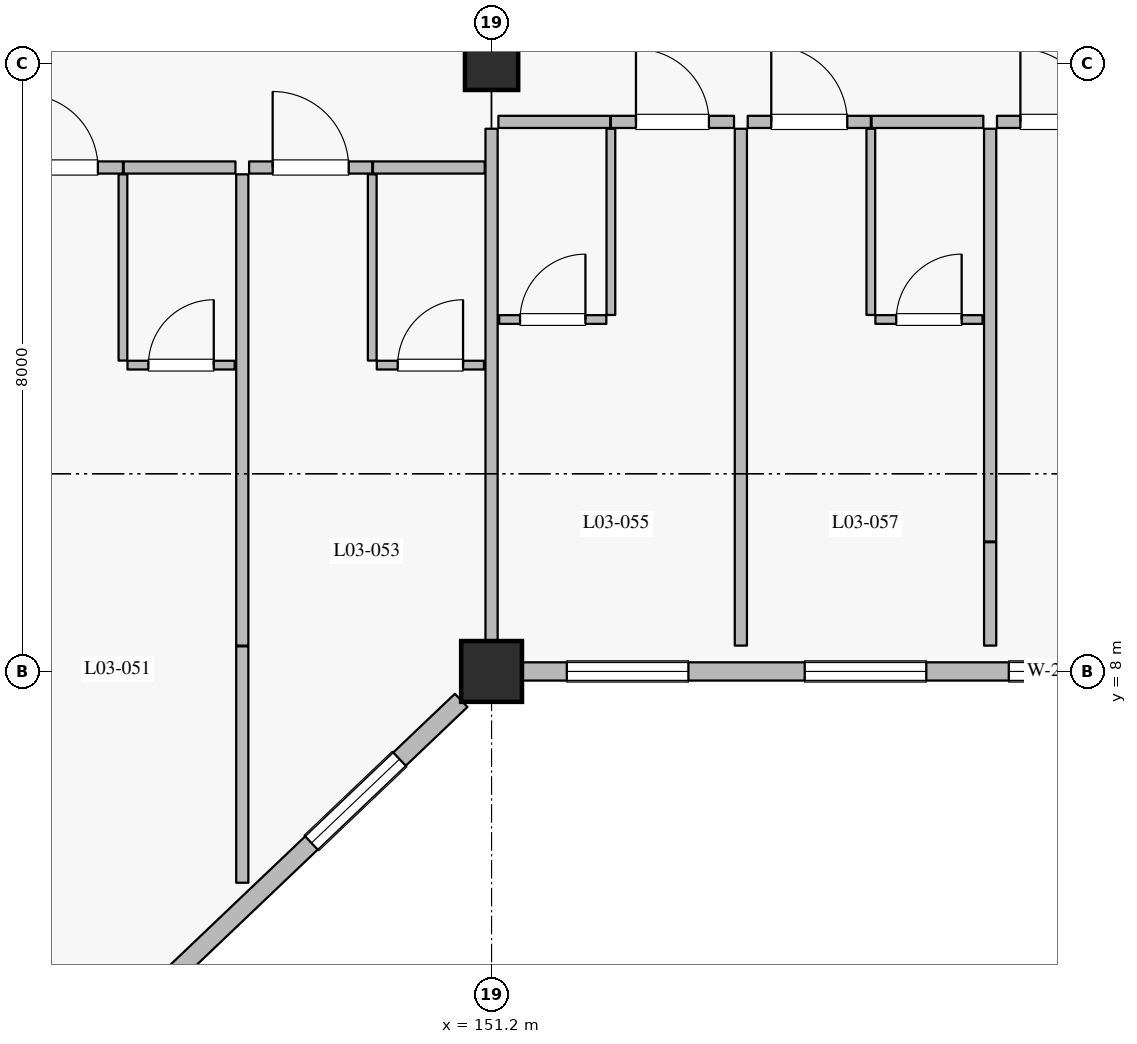
"""IFC4 building model, lengths in metres.
Left out: names, types, materials, properties, quantities, classifications, styles, units other than length and angle.
Written with IfcOpenShell. Run it as: python <this file> out.ifc"""

import sys

from ifc_helpers import new_model, si_unit, direction, frame, frame_2d, origin, origin_2d, place, context, subcontext, project, spatial, rectangle, extrude, element, fill, save


model = new_model("IFC4")
c1 = context("Model", 3, precision=1e-05, world=origin(), true_north=direction((0.0, 1.0)))
c2 = subcontext(c1, "Body", "Model", "MODEL_VIEW")
j1 = project(units=[si_unit("LENGTHUNIT", "METRE"), si_unit("PLANEANGLEUNIT", "RADIAN")], contexts=[c1])
p1 = place(None, origin())
s1 = spatial("IfcSite", under=j1, at=p1, CompositionType="ELEMENT")
p2 = place(p1, origin())
s2 = spatial("IfcBuilding", under=s1, at=p2, CompositionType="ELEMENT")
p3 = place(p2, frame((0.0, 0.0, 16.2)))
s3 = spatial("IfcBuildingStorey", under=s2, at=p3, CompositionType="ELEMENT", Elevation=16.2)
p4 = place(p3, frame((151.2, 8.0, 0.0), z_axis=(0.0, 0.0, 1.0), x_axis=(1.0, 0.0, 0.0)))
e1 = element("IfcColumn", 1, at=p4, inside=s3, PredefinedType="COLUMN", context=c2, shape_type="SweptSolid", body=[
    extrude(rectangle(XDim=0.8, YDim=0.8, at=origin_2d()), origin(), (0.0, 0.0, 1.0), 4.8),
])
p5 = place(p3, frame((151.2, 16.0, 0.0), z_axis=(0.0, 0.0, 1.0), x_axis=(1.0, 0.0, 0.0)))
e2 = element("IfcColumn", 2, at=p5, inside=s3, PredefinedType="COLUMN", context=c2, shape_type="SweptSolid", body=[
    extrude(rectangle(XDim=0.7, YDim=0.7, at=origin_2d()), origin(), (0.0, 0.0, 1.0), 4.8),
])
p6 = place(p3, frame((150.8, 7.619, 0.0), z_axis=(0.0, 0.0, 1.0), x_axis=(-0.724156739794, -0.689635422677, 0.0)))
e3 = element("IfcWall", 3, at=p6, inside=s3, PredefinedType="SOLIDWALL", context=c2, shape_type="SweptSolid", body=[
    extrude(rectangle(XDim=10.495, YDim=0.24, at=frame_2d((5.248, 0.0))), origin(), (0.0, 0.0, 1.0), 4.13),
])
p7 = place(p6, frame((1.12, 0.0, 0.8)))
e4 = element("IfcOpeningElement", 4, at=p7, cuts=e3, PredefinedType="OPENING", context=c2, shape_type="SweptSolid", body=[
    extrude(rectangle(XDim=1.6, YDim=1.6, at=frame_2d((0.8, 0.8))), frame((0.0, 0.13, 0.0), z_axis=(0.0, -1.0, 0.0), x_axis=(1.0, 0.0, 0.0)), (0.0, 0.0, 1.0), 0.26),
])
p8 = place(p6, frame((5.442, 0.0, 0.8)))
e5 = element("IfcOpeningElement", 5, at=p8, cuts=e3, PredefinedType="OPENING", context=c2, shape_type="SweptSolid", body=[
    extrude(rectangle(XDim=1.6, YDim=1.6, at=frame_2d((0.8, 0.8))), frame((0.0, 0.13, 0.0), z_axis=(0.0, -1.0, 0.0), x_axis=(1.0, 0.0, 0.0)), (0.0, 0.0, 1.0), 0.26),
])
p9 = place(p6, frame((8.77, 0.0, 0.8)))
e6 = element("IfcOpeningElement", 6, at=p9, cuts=e3, PredefinedType="OPENING", context=c2, shape_type="SweptSolid", body=[
    extrude(rectangle(XDim=1.6, YDim=1.6, at=frame_2d((0.8, 0.8))), frame((0.0, 0.13, 0.0), z_axis=(0.0, -1.0, 0.0), x_axis=(1.0, 0.0, 0.0)), (0.0, 0.0, 1.0), 0.26),
])
p10 = place(p3, frame((159.2, 8.0, 0.0), z_axis=(0.0, 0.0, 1.0), x_axis=(-1.0, 0.0, 0.0)))
e7 = element("IfcWall", 7, at=p10, inside=s3, PredefinedType="SOLIDWALL", context=c2, shape_type="SweptSolid", body=[
    extrude(rectangle(XDim=7.6, YDim=0.24, at=frame_2d((3.8, 0.0))), origin(), (0.0, 0.0, 1.0), 4.13),
])
p11 = place(p10, frame((0.145, 0.0, 0.8)))
e8 = element("IfcOpeningElement", 8, at=p11, cuts=e7, PredefinedType="OPENING", context=c2, shape_type="SweptSolid", body=[
    extrude(rectangle(XDim=1.05, YDim=1.65, at=frame_2d((0.525, 0.825))), frame((0.0, 0.13, 0.0), z_axis=(0.0, -1.0, 0.0), x_axis=(1.0, 0.0, 0.0)), (0.0, 0.0, 1.0), 0.26),
])
p12 = place(p10, frame((2.28, 0.0, 0.8)))
e9 = element("IfcOpeningElement", 9, at=p12, cuts=e7, PredefinedType="OPENING", context=c2, shape_type="SweptSolid", body=[
    extrude(rectangle(XDim=1.6, YDim=1.6, at=frame_2d((0.8, 0.8))), frame((0.0, 0.13, 0.0), z_axis=(0.0, -1.0, 0.0), x_axis=(1.0, 0.0, 0.0)), (0.0, 0.0, 1.0), 0.26),
])
p13 = place(p10, frame((5.41, 0.0, 0.8)))
e10 = element("IfcOpeningElement", 10, at=p13, cuts=e7, PredefinedType="OPENING", context=c2, shape_type="SweptSolid", body=[
    extrude(rectangle(XDim=1.6, YDim=1.6, at=frame_2d((0.8, 0.8))), frame((0.0, 0.13, 0.0), z_axis=(0.0, -1.0, 0.0), x_axis=(1.0, 0.0, 0.0)), (0.0, 0.0, 1.0), 0.26),
])
p14 = place(p3, frame((144.73, 14.63, 0.0), z_axis=(0.0, 0.0, 1.0), x_axis=(1.0, 0.0, 0.0)))
e11 = element("IfcWall", 11, at=p14, inside=s3, PredefinedType="PARTITIONING", context=c2, shape_type="SweptSolid", body=[
    extrude(rectangle(XDim=1.62, YDim=0.16, at=frame_2d((0.81, 0.0))), origin(), (0.0, 0.0, 1.0), 4.535),
])
p15 = place(p14, frame((0.33, 0.0, 0.0)))
e12 = element("IfcOpeningElement", 12, at=p15, cuts=e11, PredefinedType="OPENING", context=c2, shape_type="SweptSolid", body=[
    extrude(rectangle(XDim=0.96, YDim=2.2, at=frame_2d((0.48, 1.1))), frame((0.0, 0.09, 0.0), z_axis=(0.0, -1.0, 0.0), x_axis=(1.0, 0.0, 0.0)), (0.0, 0.0, 1.0), 0.18),
])
p16 = place(p3, frame((146.36, 14.63, 0.0), z_axis=(0.0, 0.0, 1.0), x_axis=(1.0, 0.0, 0.0)))
e13 = element("IfcWall", 13, at=p16, inside=s3, PredefinedType="PARTITIONING", context=c2, shape_type="SweptSolid", body=[
    extrude(rectangle(XDim=1.47, YDim=0.16, at=frame_2d((0.735, 0.0))), origin(), (0.0, 0.0, 1.0), 4.535),
])
p17 = place(p3, frame((146.35, 12.09, 0.0), z_axis=(0.0, 0.0, 1.0), x_axis=(0.0, 1.0, 0.0)))
e14 = element("IfcWall", 14, at=p17, inside=s3, PredefinedType="PARTITIONING", context=c2, shape_type="SweptSolid", body=[
    extrude(rectangle(XDim=2.45, YDim=0.115, at=frame_2d((1.225, 0.0))), origin(), (0.0, 0.0, 1.0), 4.535),
])
p18 = place(p3, frame((146.41, 12.03, 0.0), z_axis=(0.0, 0.0, 1.0), x_axis=(1.0, 0.0, 0.0)))
e15 = element("IfcWall", 15, at=p18, inside=s3, PredefinedType="PARTITIONING", context=c2, shape_type="SweptSolid", body=[
    extrude(rectangle(XDim=1.41, YDim=0.115, at=frame_2d((0.705, 0.0))), origin(), (0.0, 0.0, 1.0), 4.535),
])
p19 = place(p18, frame((0.275, 0.0, 0.0)))
e16 = element("IfcOpeningElement", 16, at=p19, cuts=e15, PredefinedType="OPENING", context=c2, shape_type="SweptSolid", body=[
    extrude(rectangle(XDim=0.86, YDim=2.12, at=frame_2d((0.43, 1.06))), frame((0.0, 0.067, 0.0), z_axis=(0.0, -1.0, 0.0), x_axis=(1.0, 0.0, 0.0)), (0.0, 0.0, 1.0), 0.135),
])
p20 = place(p3, frame((147.92, 5.22, 0.0), z_axis=(0.0, 0.0, 1.0), x_axis=(0.0, 1.0, 0.0)))
e17 = element("IfcWall", 17, at=p20, inside=s3, PredefinedType="PARTITIONING", context=c2, shape_type="SweptSolid", body=[
    extrude(rectangle(XDim=3.11, YDim=0.16, at=frame_2d((1.555, 0.0))), origin(), (0.0, 0.0, 1.0), 4.535),
])
p21 = place(p3, frame((148.01, 14.63, 0.0), z_axis=(0.0, 0.0, 1.0), x_axis=(1.0, 0.0, 0.0)))
e18 = element("IfcWall", 18, at=p21, inside=s3, PredefinedType="PARTITIONING", context=c2, shape_type="SweptSolid", body=[
    extrude(rectangle(XDim=1.62, YDim=0.16, at=frame_2d((0.81, 0.0))), origin(), (0.0, 0.0, 1.0), 4.535),
])
p22 = place(p21, frame((0.31, 0.0, 0.0)))
e19 = element("IfcOpeningElement", 19, at=p22, cuts=e18, PredefinedType="OPENING", context=c2, shape_type="SweptSolid", body=[
    extrude(rectangle(XDim=1.0, YDim=2.25, at=frame_2d((0.5, 1.125))), frame((0.0, 0.09, 0.0), z_axis=(0.0, -1.0, 0.0), x_axis=(1.0, 0.0, 0.0)), (0.0, 0.0, 1.0), 0.18),
])
p23 = place(p3, frame((149.64, 14.63, 0.0), z_axis=(0.0, 0.0, 1.0), x_axis=(1.0, 0.0, 0.0)))
e20 = element("IfcWall", 20, at=p23, inside=s3, PredefinedType="PARTITIONING", context=c2, shape_type="SweptSolid", body=[
    extrude(rectangle(XDim=1.47, YDim=0.16, at=frame_2d((0.735, 0.0))), origin(), (0.0, 0.0, 1.0), 4.535),
])
p24 = place(p3, frame((149.63, 12.09, 0.0), z_axis=(0.0, 0.0, 1.0), x_axis=(0.0, 1.0, 0.0)))
e21 = element("IfcWall", 21, at=p24, inside=s3, PredefinedType="PARTITIONING", context=c2, shape_type="SweptSolid", body=[
    extrude(rectangle(XDim=2.45, YDim=0.115, at=frame_2d((1.225, 0.0))), origin(), (0.0, 0.0, 1.0), 4.535),
])
p25 = place(p3, frame((149.69, 12.03, 0.0), z_axis=(0.0, 0.0, 1.0), x_axis=(1.0, 0.0, 0.0)))
e22 = element("IfcWall", 22, at=p25, inside=s3, PredefinedType="PARTITIONING", context=c2, shape_type="SweptSolid", body=[
    extrude(rectangle(XDim=1.41, YDim=0.115, at=frame_2d((0.705, 0.0))), origin(), (0.0, 0.0, 1.0), 4.535),
])
p26 = place(p25, frame((0.275, 0.0, 0.0)))
e23 = element("IfcOpeningElement", 23, at=p26, cuts=e22, PredefinedType="OPENING", context=c2, shape_type="SweptSolid", body=[
    extrude(rectangle(XDim=0.86, YDim=2.12, at=frame_2d((0.43, 1.06))), frame((0.0, 0.067, 0.0), z_axis=(0.0, -1.0, 0.0), x_axis=(1.0, 0.0, 0.0)), (0.0, 0.0, 1.0), 0.135),
])
p27 = place(p3, frame((147.92, 8.34, 0.0), z_axis=(0.0, 0.0, 1.0), x_axis=(0.0, 1.0, 0.0)))
e24 = element("IfcWall", 24, at=p27, inside=s3, PredefinedType="PARTITIONING", context=c2, shape_type="SweptSolid", body=[
    extrude(rectangle(XDim=6.2, YDim=0.16, at=frame_2d((3.1, 0.0))), origin(), (0.0, 0.0, 1.0), 4.535),
])
p28 = place(p3, frame((151.29, 15.23, 0.0), z_axis=(0.0, 0.0, 1.0), x_axis=(1.0, 0.0, 0.0)))
e25 = element("IfcWall", 25, at=p28, inside=s3, PredefinedType="PARTITIONING", context=c2, shape_type="SweptSolid", body=[
    extrude(rectangle(XDim=1.47, YDim=0.16, at=frame_2d((0.735, 0.0))), origin(), (0.0, 0.0, 1.0), 4.535),
])
p29 = place(p3, frame((152.77, 15.23, 0.0), z_axis=(0.0, 0.0, 1.0), x_axis=(1.0, 0.0, 0.0)))
e26 = element("IfcWall", 26, at=p29, inside=s3, PredefinedType="PARTITIONING", context=c2, shape_type="SweptSolid", body=[
    extrude(rectangle(XDim=1.62, YDim=0.16, at=frame_2d((0.81, 0.0))), origin(), (0.0, 0.0, 1.0), 4.535),
])
p30 = place(p29, frame((0.33, 0.0, 0.0)))
e27 = element("IfcOpeningElement", 27, at=p30, cuts=e26, PredefinedType="OPENING", context=c2, shape_type="SweptSolid", body=[
    extrude(rectangle(XDim=0.96, YDim=2.2, at=frame_2d((0.48, 1.1))), frame((0.0, 0.09, 0.0), z_axis=(0.0, -1.0, 0.0), x_axis=(1.0, 0.0, 0.0)), (0.0, 0.0, 1.0), 0.18),
])
p31 = place(p3, frame((152.77, 12.69, 0.0), z_axis=(0.0, 0.0, 1.0), x_axis=(0.0, 1.0, 0.0)))
e28 = element("IfcWall", 28, at=p31, inside=s3, PredefinedType="PARTITIONING", context=c2, shape_type="SweptSolid", body=[
    extrude(rectangle(XDim=2.45, YDim=0.115, at=frame_2d((1.225, 0.0))), origin(), (0.0, 0.0, 1.0), 4.535),
])
p32 = place(p3, frame((151.3, 12.63, 0.0), z_axis=(0.0, 0.0, 1.0), x_axis=(1.0, 0.0, 0.0)))
e29 = element("IfcWall", 29, at=p32, inside=s3, PredefinedType="PARTITIONING", context=c2, shape_type="SweptSolid", body=[
    extrude(rectangle(XDim=1.41, YDim=0.115, at=frame_2d((0.705, 0.0))), origin(), (0.0, 0.0, 1.0), 4.535),
])
p33 = place(p32, frame((0.275, 0.0, 0.0)))
e30 = element("IfcOpeningElement", 30, at=p33, cuts=e29, PredefinedType="OPENING", context=c2, shape_type="SweptSolid", body=[
    extrude(rectangle(XDim=0.86, YDim=2.12, at=frame_2d((0.43, 1.06))), frame((0.0, 0.067, 0.0), z_axis=(0.0, -1.0, 0.0), x_axis=(1.0, 0.0, 0.0)), (0.0, 0.0, 1.0), 0.135),
])
p34 = place(p3, frame((151.2, 8.34, 0.0), z_axis=(0.0, 0.0, 1.0), x_axis=(0.0, 1.0, 0.0)))
e31 = element("IfcWall", 31, at=p34, inside=s3, PredefinedType="PARTITIONING", context=c2, shape_type="SweptSolid", body=[
    extrude(rectangle(XDim=6.8, YDim=0.16, at=frame_2d((3.4, 0.0))), origin(), (0.0, 0.0, 1.0), 3.98),
])
p35 = place(p3, frame((154.57, 15.23, 0.0), z_axis=(0.0, 0.0, 1.0), x_axis=(1.0, 0.0, 0.0)))
e32 = element("IfcWall", 32, at=p35, inside=s3, PredefinedType="PARTITIONING", context=c2, shape_type="SweptSolid", body=[
    extrude(rectangle(XDim=1.62, YDim=0.16, at=frame_2d((0.81, 0.0))), origin(), (0.0, 0.0, 1.0), 4.535),
])
p36 = place(p35, frame((0.31, 0.0, 0.0)))
e33 = element("IfcOpeningElement", 33, at=p36, cuts=e32, PredefinedType="OPENING", context=c2, shape_type="SweptSolid", body=[
    extrude(rectangle(XDim=1.0, YDim=2.25, at=frame_2d((0.5, 1.125))), frame((0.0, 0.09, 0.0), z_axis=(0.0, -1.0, 0.0), x_axis=(1.0, 0.0, 0.0)), (0.0, 0.0, 1.0), 0.18),
])
p37 = place(p3, frame((156.2, 15.23, 0.0), z_axis=(0.0, 0.0, 1.0), x_axis=(1.0, 0.0, 0.0)))
e34 = element("IfcWall", 34, at=p37, inside=s3, PredefinedType="PARTITIONING", context=c2, shape_type="SweptSolid", body=[
    extrude(rectangle(XDim=1.47, YDim=0.16, at=frame_2d((0.735, 0.0))), origin(), (0.0, 0.0, 1.0), 4.535),
])
p38 = place(p3, frame((156.19, 12.69, 0.0), z_axis=(0.0, 0.0, 1.0), x_axis=(0.0, 1.0, 0.0)))
e35 = element("IfcWall", 35, at=p38, inside=s3, PredefinedType="PARTITIONING", context=c2, shape_type="SweptSolid", body=[
    extrude(rectangle(XDim=2.45, YDim=0.115, at=frame_2d((1.225, 0.0))), origin(), (0.0, 0.0, 1.0), 4.535),
])
p39 = place(p3, frame((156.25, 12.63, 0.0), z_axis=(0.0, 0.0, 1.0), x_axis=(1.0, 0.0, 0.0)))
e36 = element("IfcWall", 36, at=p39, inside=s3, PredefinedType="PARTITIONING", context=c2, shape_type="SweptSolid", body=[
    extrude(rectangle(XDim=1.41, YDim=0.115, at=frame_2d((0.705, 0.0))), origin(), (0.0, 0.0, 1.0), 4.535),
])
p40 = place(p39, frame((0.275, 0.0, 0.0)))
e37 = element("IfcOpeningElement", 37, at=p40, cuts=e36, PredefinedType="OPENING", context=c2, shape_type="SweptSolid", body=[
    extrude(rectangle(XDim=0.86, YDim=2.12, at=frame_2d((0.43, 1.06))), frame((0.0, 0.067, 0.0), z_axis=(0.0, -1.0, 0.0), x_axis=(1.0, 0.0, 0.0)), (0.0, 0.0, 1.0), 0.135),
])
p41 = place(p3, frame((154.48, 8.34, 0.0), z_axis=(0.0, 0.0, 1.0), x_axis=(0.0, 1.0, 0.0)))
e38 = element("IfcWall", 38, at=p41, inside=s3, PredefinedType="PARTITIONING", context=c2, shape_type="SweptSolid", body=[
    extrude(rectangle(XDim=6.8, YDim=0.16, at=frame_2d((3.4, 0.0))), origin(), (0.0, 0.0, 1.0), 4.535),
])
p42 = place(p3, frame((157.76, 8.34, 0.0), z_axis=(0.0, 0.0, 1.0), x_axis=(0.0, 1.0, 0.0)))
e39 = element("IfcWall", 39, at=p42, inside=s3, PredefinedType="PARTITIONING", context=c2, shape_type="SweptSolid", body=[
    extrude(rectangle(XDim=1.36, YDim=0.16, at=frame_2d((0.68, 0.0))), origin(), (0.0, 0.0, 1.0), 4.535),
])
p43 = place(p3, frame((157.85, 15.23, 0.0), z_axis=(0.0, 0.0, 1.0), x_axis=(1.0, 0.0, 0.0)))
e40 = element("IfcWall", 40, at=p43, inside=s3, PredefinedType="PARTITIONING", context=c2, shape_type="SweptSolid", body=[
    extrude(rectangle(XDim=1.62, YDim=0.16, at=frame_2d((0.81, 0.0))), origin(), (0.0, 0.0, 1.0), 4.535),
])
p44 = place(p43, frame((0.308, 0.0, 0.0)))
e41 = element("IfcOpeningElement", 41, at=p44, cuts=e40, PredefinedType="OPENING", context=c2, shape_type="SweptSolid", body=[
    extrude(rectangle(XDim=0.96, YDim=2.2, at=frame_2d((0.48, 1.1))), frame((0.0, 0.09, 0.0), z_axis=(0.0, -1.0, 0.0), x_axis=(1.0, 0.0, 0.0)), (0.0, 0.0, 1.0), 0.18),
])
p45 = place(p3, frame((157.76, 9.71, 0.0), z_axis=(0.0, 0.0, 1.0), x_axis=(0.0, 1.0, 0.0)))
e42 = element("IfcWall", 42, at=p45, inside=s3, PredefinedType="PARTITIONING", context=c2, shape_type="SweptSolid", body=[
    extrude(rectangle(XDim=5.43, YDim=0.16, at=frame_2d((2.715, 0.0))), origin(), (0.0, 0.0, 1.0), 4.535),
])
p46 = place(p7, origin())
e43 = element("IfcWindow", 43, at=p46, inside=s3, PartitioningType="SINGLE_PANEL", PredefinedType="WINDOW", context=c2, shape_type="SweptSolid", body=[
    extrude(rectangle(XDim=1.6, YDim=1.6, at=frame_2d((0.8, 0.8))), frame((0.0, 0.03, 0.0), z_axis=(0.0, -1.0, 0.0), x_axis=(1.0, 0.0, 0.0)), (0.0, 0.0, 1.0), 0.06),
])
fill(e4, e43)
p47 = place(p11, origin())
e44 = element("IfcWindow", 44, at=p47, inside=s3, PartitioningType="SINGLE_PANEL", PredefinedType="WINDOW", context=c2, shape_type="SweptSolid", body=[
    extrude(rectangle(XDim=1.05, YDim=1.65, at=frame_2d((0.525, 0.825))), frame((0.0, 0.03, 0.0), z_axis=(0.0, -1.0, 0.0), x_axis=(1.0, 0.0, 0.0)), (0.0, 0.0, 1.0), 0.06),
])
fill(e8, e44)
p48 = place(p12, origin())
e45 = element("IfcWindow", 45, at=p48, inside=s3, PartitioningType="SINGLE_PANEL", PredefinedType="WINDOW", context=c2, shape_type="SweptSolid", body=[
    extrude(rectangle(XDim=1.6, YDim=1.6, at=frame_2d((0.8, 0.8))), frame((0.0, 0.03, 0.0), z_axis=(0.0, -1.0, 0.0), x_axis=(1.0, 0.0, 0.0)), (0.0, 0.0, 1.0), 0.06),
])
fill(e9, e45)
p49 = place(p13, origin())
e46 = element("IfcWindow", 46, at=p49, inside=s3, PartitioningType="SINGLE_PANEL", PredefinedType="WINDOW", context=c2, shape_type="SweptSolid", body=[
    extrude(rectangle(XDim=1.6, YDim=1.6, at=frame_2d((0.8, 0.8))), frame((0.0, 0.03, 0.0), z_axis=(0.0, -1.0, 0.0), x_axis=(1.0, 0.0, 0.0)), (0.0, 0.0, 1.0), 0.06),
])
fill(e10, e46)
p50 = place(p15, origin())
e47 = element("IfcDoor", 47, at=p50, inside=s3, OperationType="SINGLE_SWING_LEFT", PredefinedType="DOOR", context=c2, shape_type="SweptSolid", body=[
    extrude(rectangle(XDim=0.96, YDim=2.2, at=frame_2d((0.48, 1.1))), frame((0.0, 0.025, 0.0), z_axis=(0.0, -1.0, 0.0), x_axis=(1.0, 0.0, 0.0)), (0.0, 0.0, 1.0), 0.05),
])
fill(e12, e47)
p51 = place(p19, origin())
e48 = element("IfcDoor", 48, at=p51, inside=s3, OperationType="SINGLE_SWING_RIGHT", PredefinedType="DOOR", context=c2, shape_type="SweptSolid", body=[
    extrude(rectangle(XDim=0.86, YDim=2.12, at=frame_2d((0.43, 1.06))), frame((0.0, 0.025, 0.0), z_axis=(0.0, -1.0, 0.0), x_axis=(1.0, 0.0, 0.0)), (0.0, 0.0, 1.0), 0.05),
])
fill(e16, e48)
p52 = place(p22, origin())
e49 = element("IfcDoor", 49, at=p52, inside=s3, OperationType="SINGLE_SWING_LEFT", PredefinedType="DOOR", context=c2, shape_type="SweptSolid", body=[
    extrude(rectangle(XDim=1.0, YDim=2.25, at=frame_2d((0.5, 1.125))), frame((0.0, 0.025, 0.0), z_axis=(0.0, -1.0, 0.0), x_axis=(1.0, 0.0, 0.0)), (0.0, 0.0, 1.0), 0.05),
])
fill(e19, e49)
p53 = place(p26, origin())
e50 = element("IfcDoor", 50, at=p53, inside=s3, OperationType="SINGLE_SWING_RIGHT", PredefinedType="DOOR", context=c2, shape_type="SweptSolid", body=[
    extrude(rectangle(XDim=0.86, YDim=2.12, at=frame_2d((0.43, 1.06))), frame((0.0, 0.025, 0.0), z_axis=(0.0, -1.0, 0.0), x_axis=(1.0, 0.0, 0.0)), (0.0, 0.0, 1.0), 0.05),
])
fill(e23, e50)
p54 = place(p30, origin())
e51 = element("IfcDoor", 51, at=p54, inside=s3, OperationType="SINGLE_SWING_LEFT", PredefinedType="DOOR", context=c2, shape_type="SweptSolid", body=[
    extrude(rectangle(XDim=0.96, YDim=2.2, at=frame_2d((0.48, 1.1))), frame((0.0, 0.025, 0.0), z_axis=(0.0, -1.0, 0.0), x_axis=(1.0, 0.0, 0.0)), (0.0, 0.0, 1.0), 0.05),
])
fill(e27, e51)
p55 = place(p33, origin())
e52 = element("IfcDoor", 52, at=p55, inside=s3, OperationType="SINGLE_SWING_RIGHT", PredefinedType="DOOR", context=c2, shape_type="SweptSolid", body=[
    extrude(rectangle(XDim=0.86, YDim=2.12, at=frame_2d((0.43, 1.06))), frame((0.0, 0.025, 0.0), z_axis=(0.0, -1.0, 0.0), x_axis=(1.0, 0.0, 0.0)), (0.0, 0.0, 1.0), 0.05),
])
fill(e30, e52)
p56 = place(p36, origin())
e53 = element("IfcDoor", 53, at=p56, inside=s3, OperationType="SINGLE_SWING_LEFT", PredefinedType="DOOR", context=c2, shape_type="SweptSolid", body=[
    extrude(rectangle(XDim=1.0, YDim=2.25, at=frame_2d((0.5, 1.125))), frame((0.0, 0.025, 0.0), z_axis=(0.0, -1.0, 0.0), x_axis=(1.0, 0.0, 0.0)), (0.0, 0.0, 1.0), 0.05),
])
fill(e33, e53)
p57 = place(p40, origin())
e54 = element("IfcDoor", 54, at=p57, inside=s3, OperationType="SINGLE_SWING_RIGHT", PredefinedType="DOOR", context=c2, shape_type="SweptSolid", body=[
    extrude(rectangle(XDim=0.86, YDim=2.12, at=frame_2d((0.43, 1.06))), frame((0.0, 0.025, 0.0), z_axis=(0.0, -1.0, 0.0), x_axis=(1.0, 0.0, 0.0)), (0.0, 0.0, 1.0), 0.05),
])
fill(e37, e54)
p58 = place(p44, origin())
e55 = element("IfcDoor", 55, at=p58, inside=s3, OperationType="SINGLE_SWING_LEFT", PredefinedType="DOOR", context=c2, shape_type="SweptSolid", body=[
    extrude(rectangle(XDim=0.96, YDim=2.2, at=frame_2d((0.48, 1.1))), frame((0.0, 0.025, 0.0), z_axis=(0.0, -1.0, 0.0), x_axis=(1.0, 0.0, 0.0)), (0.0, 0.0, 1.0), 0.05),
])
fill(e41, e55)
save(model, sys.argv[1])
